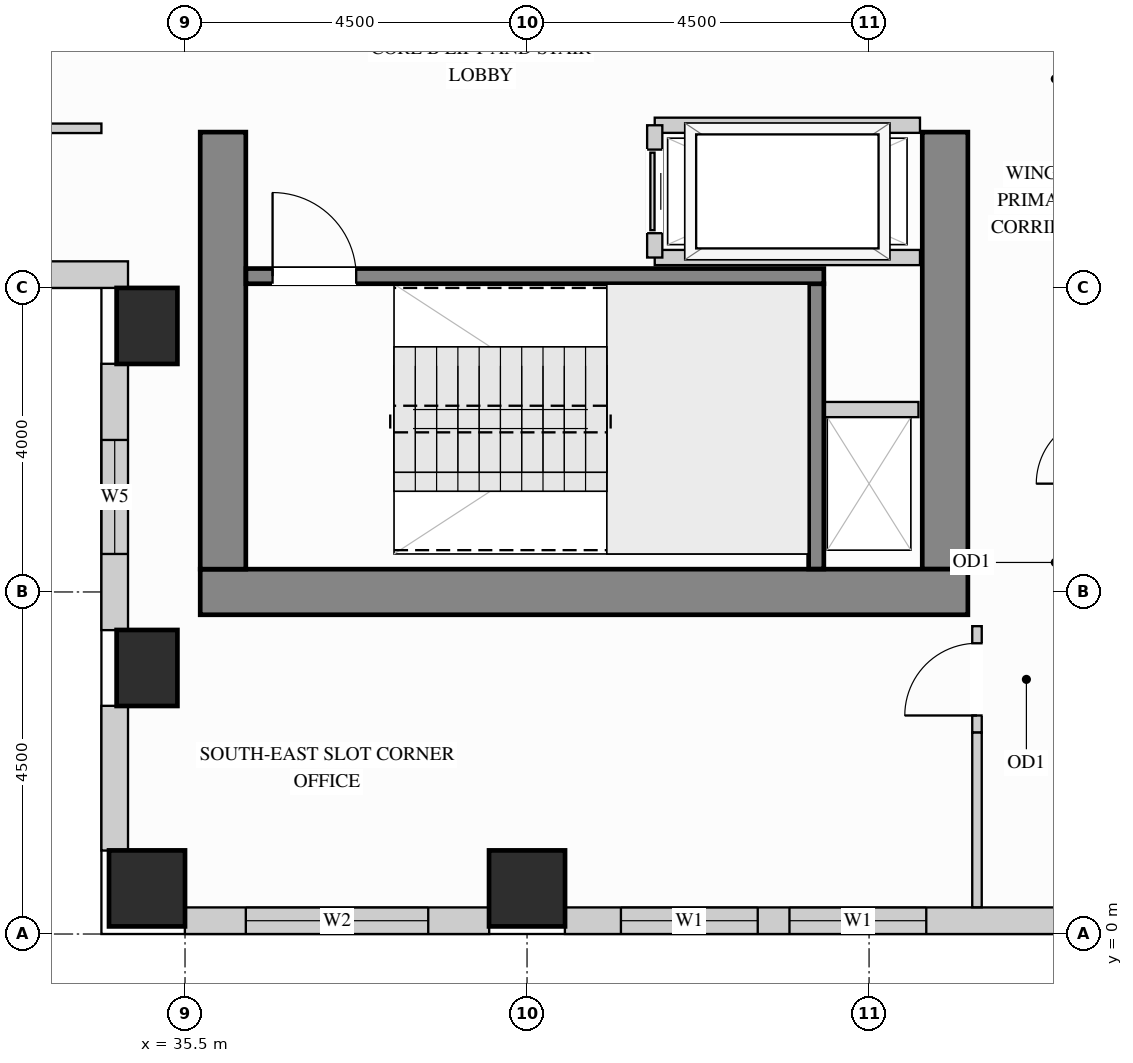
"""IFC4 building model, lengths in metres.
Left out: names, types, materials, properties, quantities, classifications, styles, units other than length and angle.
Written with IfcOpenShell. Run it as: python <this file> out.ifc"""

import sys

from ifc_helpers import new_model, si_unit, direction, frame, frame_2d, origin, origin_2d, place, context, subcontext, project, spatial, rectangle, extrude, source, transform, mapped, element, fill, save


model = new_model("IFC4")
c1 = context("Model", 3, precision=1e-05, world=origin(), true_north=direction((0.0, 1.0)))
c2 = subcontext(c1, "Body", "Model", "MODEL_VIEW")
j1 = project(units=[si_unit("LENGTHUNIT", "METRE"), si_unit("PLANEANGLEUNIT", "RADIAN")], contexts=[c1])
p1 = place(None, origin())
s1 = spatial("IfcSite", under=j1, at=p1, CompositionType="ELEMENT")
p2 = place(p1, origin())
s2 = spatial("IfcBuilding", under=s1, at=p2, CompositionType="ELEMENT")
p3 = place(p2, frame((0.0, 0.0, 182.7)))
s3 = spatial("IfcBuildingStorey", under=s2, at=p3, CompositionType="ELEMENT", Elevation=182.7)
m1 = source(origin(), c2, "Body", "SweptSolid", [
    extrude(rectangle(XDim=0.8, YDim=1.0, at=origin_2d()), origin(), (0.0, 0.0, 1.0), 3.4),
])
for number, where, z_axis, x_axis in (
    (1, (35.0, 3.5, 0.0), (0.0, 0.0, 1.0), (1.0, 0.0, 0.0)),
    (2, (35.0, 8.0, 0.0), (0.0, 0.0, 1.0), (1.0, 0.0, 0.0)),
):
    element("IfcColumn", number, at=place(p3, frame(where, z_axis=z_axis, x_axis=x_axis)), inside=s3, PredefinedType="COLUMN", context=c2, shape_type="MappedRepresentation", body=[
        mapped(m1, transform((0.0, 0.0, 0.0), x_axis=(1.0, 0.0, 0.0), y_axis=(0.0, 1.0, 0.0), z_axis=(0.0, 0.0, 1.0))),
    ])
m2 = source(origin(), c2, "Body", "SweptSolid", [
    extrude(rectangle(XDim=1.0, YDim=1.0, at=origin_2d()), origin(), (0.0, 0.0, 1.0), 3.4),
])
for number, where, z_axis, x_axis in (
    (3, (35.0, 0.6, 0.0), (0.0, 0.0, 1.0), (1.0, 0.0, 0.0)),
    (4, (40.0, 0.6, 0.0), (0.0, 0.0, 1.0), (1.0, 0.0, 0.0)),
):
    element("IfcColumn", number, at=place(p3, frame(where, z_axis=z_axis, x_axis=x_axis)), inside=s3, PredefinedType="COLUMN", context=c2, shape_type="MappedRepresentation", body=[
        mapped(m2, transform((0.0, 0.0, 0.0), x_axis=(1.0, 0.0, 0.0), y_axis=(0.0, 1.0, 0.0), z_axis=(0.0, 0.0, 1.0))),
    ])
m3 = source(origin(), c2, "Body", "SweptSolid", [
    extrude(rectangle(XDim=5.75, YDim=0.6, at=frame_2d((2.875, 0.0))), origin(), (0.0, 0.0, 1.0), 3.4),
])
p4 = place(p3, frame((45.5, 4.8, 0.0), z_axis=(0.0, 0.0, 1.0), x_axis=(0.0, 1.0, 0.0)))
e5 = element("IfcWall", 5, at=p4, inside=s3, PredefinedType="SHEAR", context=c2, shape_type="MappedRepresentation", body=[
    mapped(m3, transform((0.0, 0.0, 0.0), x_axis=(1.0, 0.0, 0.0), y_axis=(0.0, 1.0, 0.0), z_axis=(0.0, 0.0, 1.0))),
])
m4 = source(origin(), c2, "Body", "SweptSolid", [
    extrude(rectangle(XDim=10.1, YDim=0.6, at=frame_2d((5.05, 0.0))), origin(), (0.0, 0.0, 1.0), 3.4),
])
p5 = place(p3, frame((35.7, 4.5, 0.0), z_axis=(0.0, 0.0, 1.0), x_axis=(1.0, 0.0, 0.0)))
e6 = element("IfcWall", 6, at=p5, inside=s3, PredefinedType="SHEAR", context=c2, shape_type="MappedRepresentation", body=[
    mapped(m4, transform((0.0, 0.0, 0.0), x_axis=(1.0, 0.0, 0.0), y_axis=(0.0, 1.0, 0.0), z_axis=(0.0, 0.0, 1.0))),
])
p6 = place(p3, frame((36.0, 4.8, 0.0), z_axis=(0.0, 0.0, 1.0), x_axis=(0.0, 1.0, 0.0)))
e7 = element("IfcWall", 7, at=p6, inside=s3, PredefinedType="SHEAR", context=c2, shape_type="MappedRepresentation", body=[
    mapped(m3, transform((0.0, 0.0, 0.0), x_axis=(1.0, 0.0, 0.0), y_axis=(0.0, 1.0, 0.0), z_axis=(0.0, 0.0, 1.0))),
])
p7 = place(p3, frame((30.898, 8.675, 0.0), z_axis=(0.0, 0.0, 1.0), x_axis=(1.0, 0.0, 0.0)))
e8 = element("IfcWall", 8, at=p7, inside=s3, PredefinedType="SOLIDWALL", context=c2, shape_type="SweptSolid", body=[
    extrude(rectangle(XDim=3.852, YDim=0.35, at=frame_2d((1.926, 0.0))), origin(), (0.0, 0.0, 1.0), 3.385),
])
p8 = place(p7, frame((1.176, 0.0, 0.78)))
e9 = element("IfcOpeningElement", 9, at=p8, cuts=e8, PredefinedType="OPENING", context=c2, shape_type="SweptSolid", body=[
    extrude(rectangle(XDim=1.5, YDim=2.0, at=frame_2d((0.75, 1.0))), frame((0.0, 0.185, 0.0), z_axis=(0.0, -1.0, 0.0), x_axis=(1.0, 0.0, 0.0)), (0.0, 0.0, 1.0), 0.37),
])
p9 = place(p3, frame((34.575, 7.502, 0.0), z_axis=(0.0, 0.0, 1.0), x_axis=(0.0, -1.0, 0.0)))
e10 = element("IfcWall", 10, at=p9, inside=s3, PredefinedType="SOLIDWALL", context=c2, shape_type="SweptSolid", body=[
    extrude(rectangle(XDim=3.504, YDim=0.35, at=frame_2d((1.752, 0.0))), origin(), (0.0, 0.0, 1.0), 2.612),
])
p10 = place(p9, frame((1.002, 0.0, 0.78)))
e11 = element("IfcOpeningElement", 11, at=p10, cuts=e10, PredefinedType="OPENING", context=c2, shape_type="SweptSolid", body=[
    extrude(rectangle(XDim=1.5, YDim=1.652, at=frame_2d((0.75, 0.826))), frame((0.0, 0.185, 0.0), z_axis=(0.0, -1.0, 0.0), x_axis=(1.0, 0.0, 0.0)), (0.0, 0.0, 1.0), 0.37),
])
m5 = source(origin(), c2, "Body", "SweptSolid", [
    extrude(rectangle(XDim=1.904, YDim=0.35, at=frame_2d((0.952, 0.0))), origin(), (0.0, 0.0, 1.0), 2.612),
])
p11 = place(p3, frame((34.575, 3.002, 0.0), z_axis=(0.0, 0.0, 1.0), x_axis=(0.0, -1.0, 0.0)))
e12 = element("IfcWall", 12, at=p11, inside=s3, PredefinedType="SOLIDWALL", context=c2, shape_type="MappedRepresentation", body=[
    mapped(m5, transform((0.0, 0.0, 0.0), x_axis=(1.0, 0.0, 0.0), y_axis=(0.0, 1.0, 0.0), z_axis=(0.0, 0.0, 1.0))),
])
p12 = place(p3, frame((35.498, 0.175, 0.0), z_axis=(0.0, 0.0, 1.0), x_axis=(1.0, 0.0, 0.0)))
e13 = element("IfcWall", 13, at=p12, inside=s3, PredefinedType="SOLIDWALL", context=c2, shape_type="SweptSolid", body=[
    extrude(rectangle(XDim=4.004, YDim=0.35, at=frame_2d((2.002, 0.0))), origin(), (0.0, 0.0, 1.0), 2.612),
])
p13 = place(p12, frame((0.802, 0.0, 0.78)))
e14 = element("IfcOpeningElement", 14, at=p13, cuts=e13, PredefinedType="OPENING", context=c2, shape_type="SweptSolid", body=[
    extrude(rectangle(XDim=2.4, YDim=1.652, at=frame_2d((1.2, 0.826))), frame((0.0, 0.185, 0.0), z_axis=(0.0, -1.0, 0.0), x_axis=(1.0, 0.0, 0.0)), (0.0, 0.0, 1.0), 0.37),
])
p14 = place(p3, frame((40.498, 0.175, 0.0), z_axis=(0.0, 0.0, 1.0), x_axis=(1.0, 0.0, 0.0)))
e15 = element("IfcWall", 15, at=p14, inside=s3, PredefinedType="SOLIDWALL", context=c2, shape_type="SweptSolid", body=[
    extrude(rectangle(XDim=6.604, YDim=0.35, at=frame_2d((3.302, 0.0))), origin(), (0.0, 0.0, 1.0), 2.612),
])
p15 = place(p14, frame((0.737, 0.0, 0.78)))
e16 = element("IfcOpeningElement", 16, at=p15, cuts=e15, PredefinedType="OPENING", context=c2, shape_type="SweptSolid", body=[
    extrude(rectangle(XDim=1.8, YDim=1.652, at=frame_2d((0.9, 0.826))), frame((0.0, 0.185, 0.0), z_axis=(0.0, -1.0, 0.0), x_axis=(1.0, 0.0, 0.0)), (0.0, 0.0, 1.0), 0.37),
])
p16 = place(p14, frame((2.955, 0.0, 0.78)))
e17 = element("IfcOpeningElement", 17, at=p16, cuts=e15, PredefinedType="OPENING", context=c2, shape_type="SweptSolid", body=[
    extrude(rectangle(XDim=1.8, YDim=1.652, at=frame_2d((0.9, 0.826))), frame((0.0, 0.185, 0.0), z_axis=(0.0, -1.0, 0.0), x_axis=(1.0, 0.0, 0.0)), (0.0, 0.0, 1.0), 0.37),
])
p17 = place(p3, frame((45.92, 2.65, 0.0), z_axis=(0.0, 0.0, 1.0), x_axis=(0.0, 1.0, 0.0)))
e18 = element("IfcWall", 18, at=p17, inside=s3, PredefinedType="PARTITIONING", context=c2, shape_type="SweptSolid", body=[
    extrude(rectangle(XDim=1.4, YDim=0.125, at=frame_2d((0.7, 0.0))), origin(), (0.0, 0.0, 1.0), 3.385),
])
p18 = place(p17, frame((0.225, 0.0, 0.0)))
e19 = element("IfcOpeningElement", 19, at=p18, cuts=e18, PredefinedType="OPENING", context=c2, shape_type="SweptSolid", body=[
    extrude(rectangle(XDim=0.95, YDim=2.15, at=frame_2d((0.475, 1.075))), frame((0.0, 0.073, 0.0), z_axis=(0.0, -1.0, 0.0), x_axis=(1.0, 0.0, 0.0)), (0.0, 0.0, 1.0), 0.145),
])
m6 = source(origin(), c2, "Body", "SweptSolid", [
    extrude(rectangle(XDim=2.298, YDim=0.125, at=frame_2d((1.149, 0.0))), origin(), (0.0, 0.0, 1.0), 3.385),
])
p19 = place(p3, frame((45.92, 0.352, 0.0), z_axis=(0.0, 0.0, 1.0), x_axis=(0.0, 1.0, 0.0)))
e20 = element("IfcWall", 20, at=p19, inside=s3, PredefinedType="PARTITIONING", context=c2, shape_type="MappedRepresentation", body=[
    mapped(m6, transform((0.0, 0.0, 0.0), x_axis=(1.0, 0.0, 0.0), y_axis=(0.0, 1.0, 0.0), z_axis=(0.0, 0.0, 1.0))),
])
p20 = place(p3, frame((26.95, 10.6, 0.0), z_axis=(0.0, 0.0, 1.0), x_axis=(1.0, 0.0, 0.0)))
e21 = element("IfcWall", 21, at=p20, inside=s3, PredefinedType="PARTITIONING", context=c2, shape_type="SweptSolid", body=[
    extrude(rectangle(XDim=7.45, YDim=0.125, at=frame_2d((3.725, 0.0))), origin(), (0.0, 0.0, 1.0), 3.385),
])
p21 = place(p20, frame((4.478, 0.0, 0.0)))
e22 = element("IfcOpeningElement", 22, at=p21, cuts=e21, PredefinedType="OPENING", context=c2, shape_type="SweptSolid", body=[
    extrude(rectangle(XDim=0.95, YDim=2.15, at=frame_2d((0.475, 1.075))), frame((0.0, 0.073, 0.0), z_axis=(0.0, -1.0, 0.0), x_axis=(1.0, 0.0, 0.0)), (0.0, 0.0, 1.0), 0.145),
])
m7 = source(origin(), c2, "Body", "SweptSolid", [
    extrude(rectangle(XDim=1.3, YDim=0.2, at=frame_2d((0.65, 0.0))), origin(), (0.0, 0.0, 1.0), 3.385),
])
p22 = place(p3, frame((43.85, 6.9, 0.0), z_axis=(0.0, 0.0, 1.0), x_axis=(1.0, 0.0, 0.0)))
e23 = element("IfcWall", 23, at=p22, inside=s3, PredefinedType="PARTITIONING", context=c2, shape_type="MappedRepresentation", body=[
    mapped(m7, transform((0.0, 0.0, 0.0), x_axis=(1.0, 0.0, 0.0), y_axis=(0.0, 1.0, 0.0), z_axis=(0.0, 0.0, 1.0))),
])
m8 = source(origin(), c2, "Body", "SweptSolid", [
    extrude(rectangle(XDim=3.49, YDim=0.2, at=frame_2d((1.745, 0.0))), origin(), (0.0, 0.0, 1.0), 3.385),
])
for number, where, z_axis, x_axis in (
    (24, (41.68, 10.64, 0.0), (0.0, 0.0, 1.0), (1.0, 0.0, 0.0)),
    (25, (41.68, 8.9, 0.0), (0.0, 0.0, 1.0), (1.0, 0.0, 0.0)),
):
    element("IfcWall", number, at=place(p3, frame(where, z_axis=z_axis, x_axis=x_axis)), inside=s3, PredefinedType="PARTITIONING", context=c2, shape_type="MappedRepresentation", body=[
        mapped(m8, transform((0.0, 0.0, 0.0), x_axis=(1.0, 0.0, 0.0), y_axis=(0.0, 1.0, 0.0), z_axis=(0.0, 0.0, 1.0))),
    ])
p23 = place(p3, frame((41.68, 8.9, 0.0), z_axis=(0.0, 0.0, 1.0), x_axis=(0.0, 1.0, 0.0)))
e26 = element("IfcWall", 26, at=p23, inside=s3, PredefinedType="PARTITIONING", context=c2, shape_type="SweptSolid", body=[
    extrude(rectangle(XDim=1.74, YDim=0.2, at=frame_2d((0.87, 0.0))), origin(), (0.0, 0.0, 1.0), 3.385),
])
p24 = place(p23, frame((0.32, 0.0, 0.0)))
e27 = element("IfcOpeningElement", 27, at=p24, cuts=e26, PredefinedType="OPENING", context=c2, shape_type="SweptSolid", body=[
    extrude(rectangle(XDim=1.1, YDim=2.2, at=frame_2d((0.55, 1.1))), frame((0.0, 0.11, 0.0), z_axis=(0.0, -1.0, 0.0), x_axis=(1.0, 0.0, 0.0)), (0.0, 0.0, 1.0), 0.22),
])
m9 = source(origin(), c2, "Body", "SweptSolid", [
    extrude(rectangle(XDim=3.753, YDim=0.2, at=frame_2d((1.876, 0.0))), origin(), (0.0, 0.0, 1.0), 3.4),
])
p25 = place(p3, frame((43.805, 4.802, 0.0), z_axis=(0.0, 0.0, 1.0), x_axis=(0.0, 1.0, 0.0)))
e28 = element("IfcWall", 28, at=p25, inside=s3, PredefinedType="SHEAR", context=c2, shape_type="MappedRepresentation", body=[
    mapped(m9, transform((0.0, 0.0, 0.0), x_axis=(1.0, 0.0, 0.0), y_axis=(0.0, 1.0, 0.0), z_axis=(0.0, 0.0, 1.0))),
])
p26 = place(p3, frame((36.302, 8.655, 0.0), z_axis=(0.0, 0.0, 1.0), x_axis=(1.0, 0.0, 0.0)))
e29 = element("IfcWall", 29, at=p26, inside=s3, PredefinedType="SHEAR", context=c2, shape_type="SweptSolid", body=[
    extrude(rectangle(XDim=7.603, YDim=0.2, at=frame_2d((3.802, 0.0))), origin(), (0.0, 0.0, 1.0), 3.4),
])
p27 = place(p26, frame((0.35, 0.0, 0.0)))
e30 = element("IfcOpeningElement", 30, at=p27, cuts=e29, PredefinedType="OPENING", context=c2, shape_type="SweptSolid", body=[
    extrude(rectangle(XDim=1.1, YDim=2.15, at=frame_2d((0.55, 1.075))), frame((0.0, 0.11, 0.0), z_axis=(0.0, -1.0, 0.0), x_axis=(1.0, 0.0, 0.0)), (0.0, 0.0, 1.0), 0.22),
])
m10 = source(origin(), c2, "Body", "SweptSolid", [
    extrude(rectangle(XDim=1.1, YDim=2.2, at=frame_2d((0.55, 1.1))), frame((0.0, 0.025, 0.0), z_axis=(0.0, -1.0, 0.0), x_axis=(1.0, 0.0, 0.0)), (0.0, 0.0, 1.0), 0.05),
])
p28 = place(p24, origin())
e31 = element("IfcDoor", 31, at=p28, inside=s3, OperationType="SLIDING_TO_LEFT", PredefinedType="DOOR", context=c2, shape_type="MappedRepresentation", body=[
    mapped(m10, transform((0.0, 0.0, 0.0), x_axis=(1.0, 0.0, 0.0), y_axis=(0.0, 1.0, 0.0), z_axis=(0.0, 0.0, 1.0))),
])
fill(e27, e31)
m11 = source(origin(), c2, "Body", "SweptSolid", [
    extrude(rectangle(XDim=0.95, YDim=2.15, at=frame_2d((0.475, 1.075))), frame((0.0, 0.025, 0.0), z_axis=(0.0, -1.0, 0.0), x_axis=(1.0, 0.0, 0.0)), (0.0, 0.0, 1.0), 0.05),
])
p29 = place(p18, origin())
e32 = element("IfcDoor", 32, at=p29, inside=s3, OperationType="SINGLE_SWING_LEFT", PredefinedType="DOOR", context=c2, shape_type="MappedRepresentation", body=[
    mapped(m11, transform((0.0, 0.0, 0.0), x_axis=(1.0, 0.0, 0.0), y_axis=(0.0, 1.0, 0.0), z_axis=(0.0, 0.0, 1.0))),
])
fill(e19, e32)
m12 = source(origin(), c2, "Body", "SweptSolid", [
    extrude(rectangle(XDim=1.1, YDim=2.15, at=frame_2d((0.55, 1.075))), frame((0.0, 0.025, 0.0), z_axis=(0.0, -1.0, 0.0), x_axis=(1.0, 0.0, 0.0)), (0.0, 0.0, 1.0), 0.05),
])
p30 = place(p27, origin())
e33 = element("IfcDoor", 33, at=p30, inside=s3, OperationType="SINGLE_SWING_LEFT", PredefinedType="DOOR", context=c2, shape_type="MappedRepresentation", body=[
    mapped(m12, transform((0.0, 0.0, 0.0), x_axis=(1.0, 0.0, 0.0), y_axis=(0.0, 1.0, 0.0), z_axis=(0.0, 0.0, 1.0))),
])
fill(e30, e33)
m13 = source(origin(), c2, "Body", "SweptSolid", [
    extrude(rectangle(XDim=1.8, YDim=1.652, at=frame_2d((0.9, 0.826))), frame((0.0, 0.03, 0.0), z_axis=(0.0, -1.0, 0.0), x_axis=(1.0, 0.0, 0.0)), (0.0, 0.0, 1.0), 0.06),
])
p31 = place(p15, origin())
e34 = element("IfcWindow", 34, at=p31, inside=s3, PartitioningType="SINGLE_PANEL", PredefinedType="WINDOW", context=c2, shape_type="MappedRepresentation", body=[
    mapped(m13, transform((0.0, 0.0, 0.0), x_axis=(1.0, 0.0, 0.0), y_axis=(0.0, 1.0, 0.0), z_axis=(0.0, 0.0, 1.0))),
])
fill(e16, e34)
p32 = place(p16, origin())
e35 = element("IfcWindow", 35, at=p32, inside=s3, PartitioningType="SINGLE_PANEL", PredefinedType="WINDOW", context=c2, shape_type="MappedRepresentation", body=[
    mapped(m13, transform((0.0, 0.0, 0.0), x_axis=(1.0, 0.0, 0.0), y_axis=(0.0, 1.0, 0.0), z_axis=(0.0, 0.0, 1.0))),
])
fill(e17, e35)
m14 = source(origin(), c2, "Body", "SweptSolid", [
    extrude(rectangle(XDim=2.4, YDim=1.652, at=frame_2d((1.2, 0.826))), frame((0.0, 0.03, 0.0), z_axis=(0.0, -1.0, 0.0), x_axis=(1.0, 0.0, 0.0)), (0.0, 0.0, 1.0), 0.06),
])
p33 = place(p13, origin())
e36 = element("IfcWindow", 36, at=p33, inside=s3, PartitioningType="SINGLE_PANEL", PredefinedType="WINDOW", context=c2, shape_type="MappedRepresentation", body=[
    mapped(m14, transform((0.0, 0.0, 0.0), x_axis=(1.0, 0.0, 0.0), y_axis=(0.0, 1.0, 0.0), z_axis=(0.0, 0.0, 1.0))),
])
fill(e14, e36)
m15 = source(origin(), c2, "Body", "SweptSolid", [
    extrude(rectangle(XDim=1.5, YDim=1.652, at=frame_2d((0.75, 0.826))), frame((0.0, 0.03, 0.0), z_axis=(0.0, -1.0, 0.0), x_axis=(1.0, 0.0, 0.0)), (0.0, 0.0, 1.0), 0.06),
])
p34 = place(p10, origin())
e37 = element("IfcWindow", 37, at=p34, inside=s3, PartitioningType="SINGLE_PANEL", PredefinedType="WINDOW", context=c2, shape_type="MappedRepresentation", body=[
    mapped(m15, transform((0.0, 0.0, 0.0), x_axis=(1.0, 0.0, 0.0), y_axis=(0.0, 1.0, 0.0), z_axis=(0.0, 0.0, 1.0))),
])
fill(e11, e37)
save(model, sys.argv[1])
